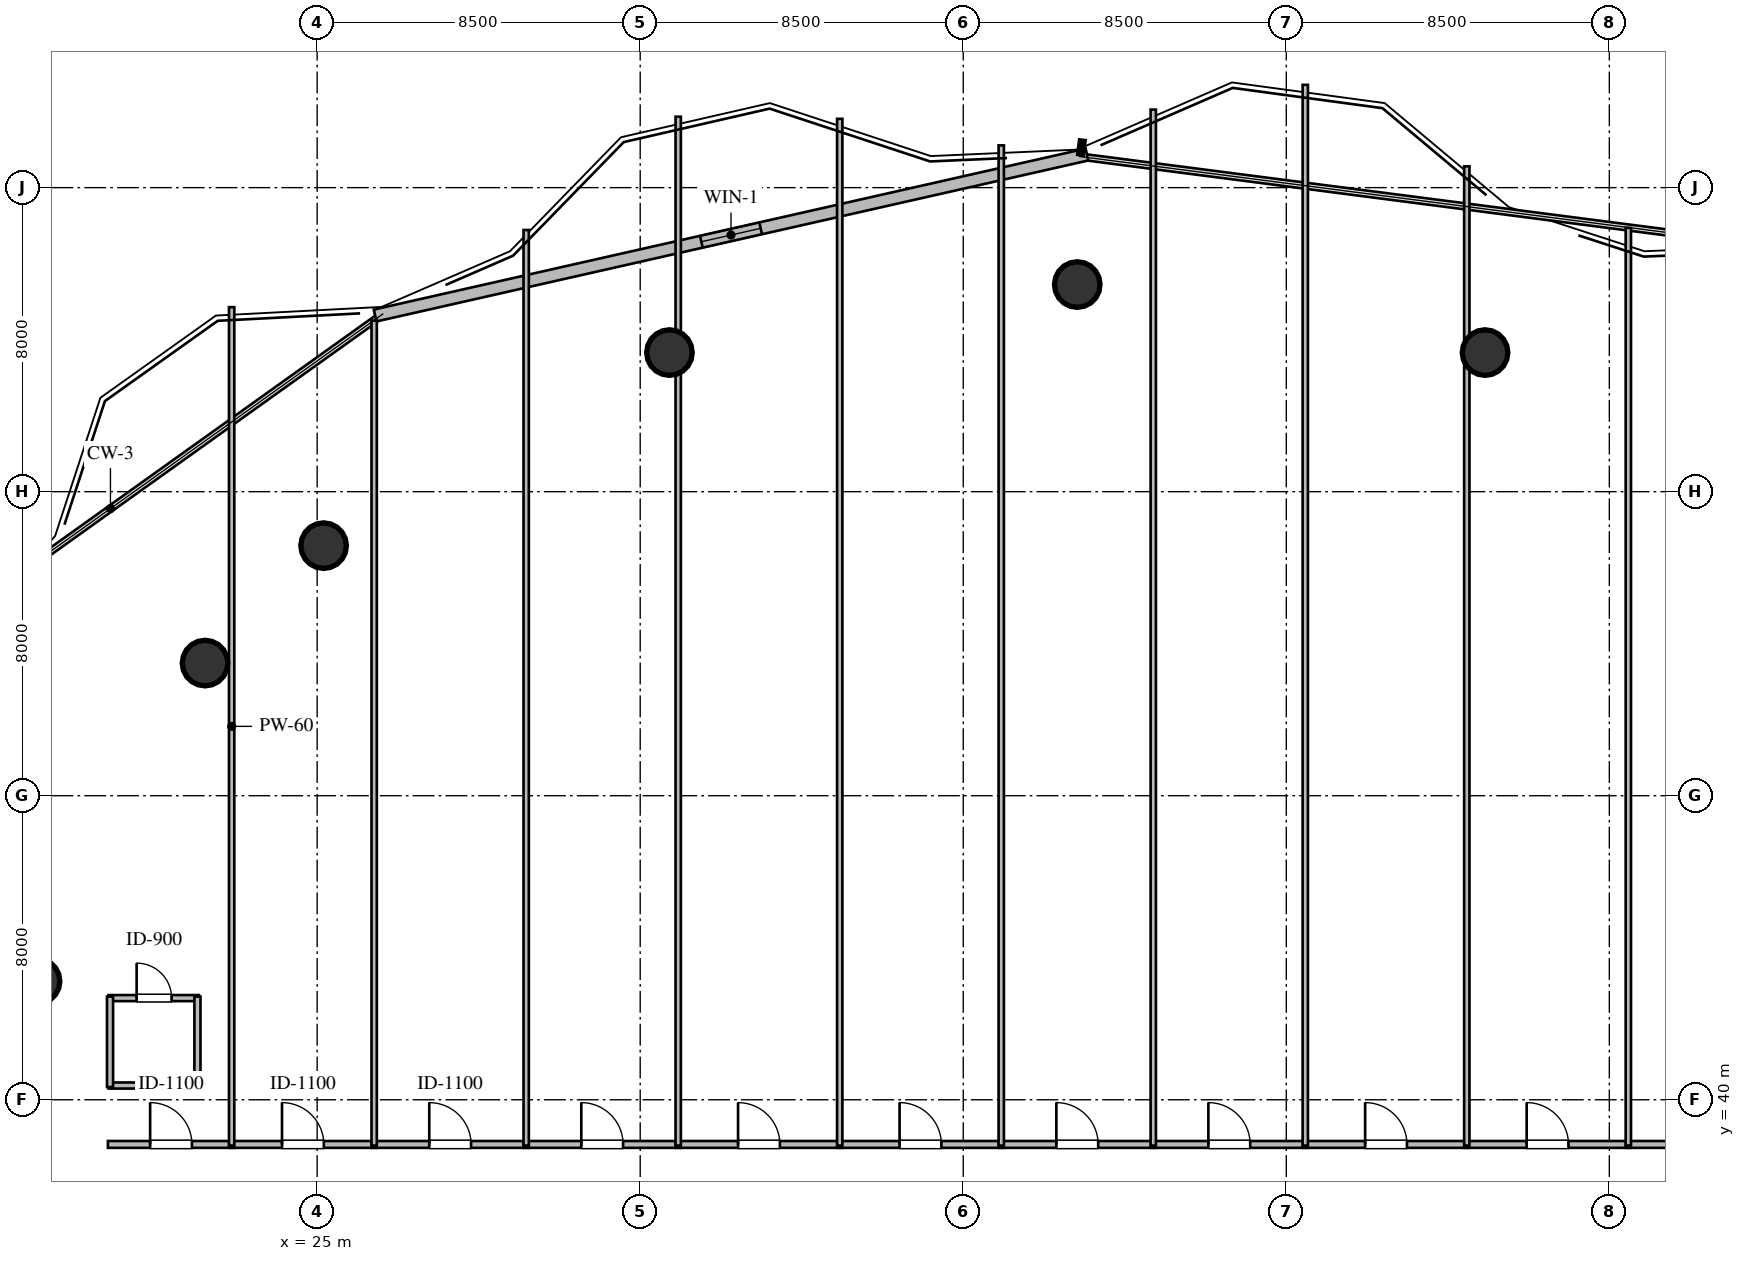
"""IFC4 building model, lengths in metres.
Left out: names, types, materials, properties, quantities, classifications, styles, units other than length and angle.
Written with IfcOpenShell. Run it as: python <this file> out.ifc"""

import sys

from ifc_helpers import new_model, si_unit, direction, frame, frame_2d, origin, origin_2d, place, context, subcontext, project, spatial, rectangle, circle, extrude, element, fill, save


model = new_model("IFC4")
c1 = context("Model", 3, precision=1e-05, world=origin(), true_north=direction((0.0, 1.0)))
c2 = subcontext(c1, "Body", "Model", "MODEL_VIEW")
j1 = project(units=[si_unit("LENGTHUNIT", "METRE"), si_unit("PLANEANGLEUNIT", "RADIAN")], contexts=[c1])
p1 = place(None, origin())
s1 = spatial("IfcSite", under=j1, at=p1, CompositionType="ELEMENT")
p2 = place(p1, origin())
s2 = spatial("IfcBuilding", under=s1, at=p2, CompositionType="ELEMENT")
p3 = place(p2, frame((0.0, 0.0, 145.8)))
s3 = spatial("IfcBuildingStorey", under=s2, at=p3, CompositionType="ELEMENT", Elevation=145.8)
for number, where, z_axis, x_axis in (
    (1, (55.73, 59.66, 0.0), (0.0, 0.0, 1.0), (1.0, 0.0, 0.0)),
    (2, (45.0, 61.45, 0.0), (0.0, 0.0, 1.0), (1.0, 0.0, 0.0)),
    (3, (34.27, 59.66, 0.0), (0.0, 0.0, 1.0), (1.0, 0.0, 0.0)),
    (4, (25.17, 54.58, 0.0), (0.0, 0.0, 1.0), (1.0, 0.0, 0.0)),
    (5, (22.05, 51.49, 0.0), (0.0, 0.0, 1.0), (1.0, 0.0, 0.0)),
    (6, (17.63, 43.12, 0.0), (0.0, 0.0, 1.0), (1.0, 0.0, 0.0)),
):
    element("IfcColumn", number, at=place(p3, frame(where, z_axis=z_axis, x_axis=x_axis)), inside=s3, PredefinedType="COLUMN", context=c2, shape_type="SweptSolid", body=[
        extrude(circle(Radius=0.6, at=origin_2d()), origin(), (0.0, 0.0, 1.0), 3.6),
    ])
p4 = place(p3, frame((26.525, 60.635, 0.0), z_axis=(0.0, 0.0, 1.0), x_axis=(0.975368700272, 0.220580820855, 0.0)))
e7 = element("IfcWall", 7, at=p4, inside=s3, PredefinedType="STANDARD", context=c2, shape_type="SweptSolid", body=[
    extrude(rectangle(XDim=19.204, YDim=0.32, at=frame_2d((9.602, 0.0))), origin(), (0.0, 0.0, 1.0), 3.36),
])
p5 = place(p4, frame((8.801, 0.0, 1.05)))
e8 = element("IfcOpeningElement", 8, at=p5, cuts=e7, PredefinedType="OPENING", context=c2, shape_type="SweptSolid", body=[
    extrude(rectangle(XDim=1.6, YDim=1.5, at=frame_2d((0.8, 0.75))), frame((0.0, 0.17, 0.0), z_axis=(0.0, -1.0, 0.0), x_axis=(1.0, 0.0, 0.0)), (0.0, 0.0, 1.0), 0.34),
])
p6 = place(p3, frame((19.51, 40.375, 0.0), z_axis=(0.0, 0.0, 1.0), x_axis=(1.0, 0.0, 0.0)))
e9 = element("IfcWall", 9, at=p6, inside=s3, PredefinedType="PLUMBINGWALL", context=c2, shape_type="SweptSolid", body=[
    extrude(rectangle(XDim=2.38, YDim=0.16, at=frame_2d((1.19, 0.0))), origin(), (0.0, 0.0, 1.0), 3.36),
])
p7 = place(p3, frame((19.51, 42.675, 0.0), z_axis=(0.0, 0.0, 1.0), x_axis=(1.0, 0.0, 0.0)))
e10 = element("IfcWall", 10, at=p7, inside=s3, PredefinedType="PLUMBINGWALL", context=c2, shape_type="SweptSolid", body=[
    extrude(rectangle(XDim=2.38, YDim=0.16, at=frame_2d((1.19, 0.0))), origin(), (0.0, 0.0, 1.0), 3.36),
])
p8 = place(p7, frame((0.74, 0.0, 0.0)))
e11 = element("IfcOpeningElement", 11, at=p8, cuts=e10, PredefinedType="OPENING", context=c2, shape_type="SweptSolid", body=[
    extrude(rectangle(XDim=0.92, YDim=2.1, at=frame_2d((0.46, 1.05))), frame((0.0, 0.09, 0.0), z_axis=(0.0, -1.0, 0.0), x_axis=(1.0, 0.0, 0.0)), (0.0, 0.0, 1.0), 0.18),
])
p9 = place(p3, frame((19.55, 40.335, 0.0), z_axis=(0.0, 0.0, 1.0), x_axis=(0.0, 1.0, 0.0)))
e12 = element("IfcWall", 12, at=p9, inside=s3, PredefinedType="PLUMBINGWALL", context=c2, shape_type="SweptSolid", body=[
    extrude(rectangle(XDim=2.38, YDim=0.16, at=frame_2d((1.19, 0.0))), origin(), (0.0, 0.0, 1.0), 3.36),
])
p10 = place(p3, frame((21.85, 40.335, 0.0), z_axis=(0.0, 0.0, 1.0), x_axis=(0.0, 1.0, 0.0)))
e13 = element("IfcWall", 13, at=p10, inside=s3, PredefinedType="PLUMBINGWALL", context=c2, shape_type="SweptSolid", body=[
    extrude(rectangle(XDim=2.38, YDim=0.16, at=frame_2d((1.19, 0.0))), origin(), (0.0, 0.0, 1.0), 2.806),
])
p11 = place(p3, frame((19.495, 38.825, 0.0), z_axis=(0.0, 0.0, 1.0), x_axis=(1.0, 0.0, 0.0)))
e14 = element("IfcWall", 14, at=p11, inside=s3, PredefinedType="PARTITIONING", context=c2, shape_type="SweptSolid", body=[
    extrude(rectangle(XDim=3.32, YDim=0.18, at=frame_2d((1.66, 0.0))), origin(), (0.0, 0.0, 1.0), 3.36),
])
p12 = place(p11, frame((1.11, 0.0, 0.0)))
e15 = element("IfcOpeningElement", 15, at=p12, cuts=e14, PredefinedType="OPENING", context=c2, shape_type="SweptSolid", body=[
    extrude(rectangle(XDim=1.1, YDim=2.1, at=frame_2d((0.55, 1.05))), frame((0.0, 0.1, 0.0), z_axis=(0.0, -1.0, 0.0), x_axis=(1.0, 0.0, 0.0)), (0.0, 0.0, 1.0), 0.2),
])
p13 = place(p3, frame((22.685, 38.825, 0.0), z_axis=(0.0, 0.0, 1.0), x_axis=(1.0, 0.0, 0.0)))
e16 = element("IfcWall", 16, at=p13, inside=s3, PredefinedType="PARTITIONING", context=c2, shape_type="SweptSolid", body=[
    extrude(rectangle(XDim=3.88, YDim=0.18, at=frame_2d((1.94, 0.0))), origin(), (0.0, 0.0, 1.0), 3.36),
])
p14 = place(p13, frame((1.39, 0.0, 0.0)))
e17 = element("IfcOpeningElement", 17, at=p14, cuts=e16, PredefinedType="OPENING", context=c2, shape_type="SweptSolid", body=[
    extrude(rectangle(XDim=1.1, YDim=2.1, at=frame_2d((0.55, 1.05))), frame((0.0, 0.1, 0.0), z_axis=(0.0, -1.0, 0.0), x_axis=(1.0, 0.0, 0.0)), (0.0, 0.0, 1.0), 0.2),
])
p15 = place(p3, frame((26.435, 38.825, 0.0), z_axis=(0.0, 0.0, 1.0), x_axis=(1.0, 0.0, 0.0)))
e18 = element("IfcWall", 18, at=p15, inside=s3, PredefinedType="PARTITIONING", context=c2, shape_type="SweptSolid", body=[
    extrude(rectangle(XDim=4.13, YDim=0.18, at=frame_2d((2.065, 0.0))), origin(), (0.0, 0.0, 1.0), 3.36),
])
p16 = place(p15, frame((1.515, 0.0, 0.0)))
e19 = element("IfcOpeningElement", 19, at=p16, cuts=e18, PredefinedType="OPENING", context=c2, shape_type="SweptSolid", body=[
    extrude(rectangle(XDim=1.1, YDim=2.1, at=frame_2d((0.55, 1.05))), frame((0.0, 0.1, 0.0), z_axis=(0.0, -1.0, 0.0), x_axis=(1.0, 0.0, 0.0)), (0.0, 0.0, 1.0), 0.2),
])
p17 = place(p3, frame((30.435, 38.825, 0.0), z_axis=(0.0, 0.0, 1.0), x_axis=(1.0, 0.0, 0.0)))
e20 = element("IfcWall", 20, at=p17, inside=s3, PredefinedType="PARTITIONING", context=c2, shape_type="SweptSolid", body=[
    extrude(rectangle(XDim=4.13, YDim=0.18, at=frame_2d((2.065, 0.0))), origin(), (0.0, 0.0, 1.0), 3.36),
])
p18 = place(p17, frame((1.515, 0.0, 0.0)))
e21 = element("IfcOpeningElement", 21, at=p18, cuts=e20, PredefinedType="OPENING", context=c2, shape_type="SweptSolid", body=[
    extrude(rectangle(XDim=1.1, YDim=2.1, at=frame_2d((0.55, 1.05))), frame((0.0, 0.1, 0.0), z_axis=(0.0, -1.0, 0.0), x_axis=(1.0, 0.0, 0.0)), (0.0, 0.0, 1.0), 0.2),
])
p19 = place(p3, frame((34.435, 38.825, 0.0), z_axis=(0.0, 0.0, 1.0), x_axis=(1.0, 0.0, 0.0)))
e22 = element("IfcWall", 22, at=p19, inside=s3, PredefinedType="PARTITIONING", context=c2, shape_type="SweptSolid", body=[
    extrude(rectangle(XDim=4.38, YDim=0.18, at=frame_2d((2.19, 0.0))), origin(), (0.0, 0.0, 1.0), 3.36),
])
p20 = place(p19, frame((1.64, 0.0, 0.0)))
e23 = element("IfcOpeningElement", 23, at=p20, cuts=e22, PredefinedType="OPENING", context=c2, shape_type="SweptSolid", body=[
    extrude(rectangle(XDim=1.1, YDim=2.1, at=frame_2d((0.55, 1.05))), frame((0.0, 0.1, 0.0), z_axis=(0.0, -1.0, 0.0), x_axis=(1.0, 0.0, 0.0)), (0.0, 0.0, 1.0), 0.2),
])
p21 = place(p3, frame((38.685, 38.825, 0.0), z_axis=(0.0, 0.0, 1.0), x_axis=(1.0, 0.0, 0.0)))
e24 = element("IfcWall", 24, at=p21, inside=s3, PredefinedType="PARTITIONING", context=c2, shape_type="SweptSolid", body=[
    extrude(rectangle(XDim=4.38, YDim=0.18, at=frame_2d((2.19, 0.0))), origin(), (0.0, 0.0, 1.0), 3.36),
])
p22 = place(p21, frame((1.64, 0.0, 0.0)))
e25 = element("IfcOpeningElement", 25, at=p22, cuts=e24, PredefinedType="OPENING", context=c2, shape_type="SweptSolid", body=[
    extrude(rectangle(XDim=1.1, YDim=2.1, at=frame_2d((0.55, 1.05))), frame((0.0, 0.1, 0.0), z_axis=(0.0, -1.0, 0.0), x_axis=(1.0, 0.0, 0.0)), (0.0, 0.0, 1.0), 0.2),
])
p23 = place(p3, frame((42.935, 38.825, 0.0), z_axis=(0.0, 0.0, 1.0), x_axis=(1.0, 0.0, 0.0)))
e26 = element("IfcWall", 26, at=p23, inside=s3, PredefinedType="PARTITIONING", context=c2, shape_type="SweptSolid", body=[
    extrude(rectangle(XDim=4.13, YDim=0.18, at=frame_2d((2.065, 0.0))), origin(), (0.0, 0.0, 1.0), 3.36),
])
p24 = place(p23, frame((1.515, 0.0, 0.0)))
e27 = element("IfcOpeningElement", 27, at=p24, cuts=e26, PredefinedType="OPENING", context=c2, shape_type="SweptSolid", body=[
    extrude(rectangle(XDim=1.1, YDim=2.1, at=frame_2d((0.55, 1.05))), frame((0.0, 0.1, 0.0), z_axis=(0.0, -1.0, 0.0), x_axis=(1.0, 0.0, 0.0)), (0.0, 0.0, 1.0), 0.2),
])
p25 = place(p3, frame((46.935, 38.825, 0.0), z_axis=(0.0, 0.0, 1.0), x_axis=(1.0, 0.0, 0.0)))
e28 = element("IfcWall", 28, at=p25, inside=s3, PredefinedType="PARTITIONING", context=c2, shape_type="SweptSolid", body=[
    extrude(rectangle(XDim=4.13, YDim=0.18, at=frame_2d((2.065, 0.0))), origin(), (0.0, 0.0, 1.0), 3.36),
])
p26 = place(p25, frame((1.515, 0.0, 0.0)))
e29 = element("IfcOpeningElement", 29, at=p26, cuts=e28, PredefinedType="OPENING", context=c2, shape_type="SweptSolid", body=[
    extrude(rectangle(XDim=1.1, YDim=2.1, at=frame_2d((0.55, 1.05))), frame((0.0, 0.1, 0.0), z_axis=(0.0, -1.0, 0.0), x_axis=(1.0, 0.0, 0.0)), (0.0, 0.0, 1.0), 0.2),
])
p27 = place(p3, frame((50.935, 38.825, 0.0), z_axis=(0.0, 0.0, 1.0), x_axis=(1.0, 0.0, 0.0)))
e30 = element("IfcWall", 30, at=p27, inside=s3, PredefinedType="PARTITIONING", context=c2, shape_type="SweptSolid", body=[
    extrude(rectangle(XDim=4.38, YDim=0.18, at=frame_2d((2.19, 0.0))), origin(), (0.0, 0.0, 1.0), 3.36),
])
p28 = place(p27, frame((1.64, 0.0, 0.0)))
e31 = element("IfcOpeningElement", 31, at=p28, cuts=e30, PredefinedType="OPENING", context=c2, shape_type="SweptSolid", body=[
    extrude(rectangle(XDim=1.1, YDim=2.1, at=frame_2d((0.55, 1.05))), frame((0.0, 0.1, 0.0), z_axis=(0.0, -1.0, 0.0), x_axis=(1.0, 0.0, 0.0)), (0.0, 0.0, 1.0), 0.2),
])
p29 = place(p3, frame((55.185, 38.825, 0.0), z_axis=(0.0, 0.0, 1.0), x_axis=(1.0, 0.0, 0.0)))
e32 = element("IfcWall", 32, at=p29, inside=s3, PredefinedType="PARTITIONING", context=c2, shape_type="SweptSolid", body=[
    extrude(rectangle(XDim=4.38, YDim=0.18, at=frame_2d((2.19, 0.0))), origin(), (0.0, 0.0, 1.0), 3.36),
])
p30 = place(p29, frame((1.64, 0.0, 0.0)))
e33 = element("IfcOpeningElement", 33, at=p30, cuts=e32, PredefinedType="OPENING", context=c2, shape_type="SweptSolid", body=[
    extrude(rectangle(XDim=1.1, YDim=2.1, at=frame_2d((0.55, 1.05))), frame((0.0, 0.1, 0.0), z_axis=(0.0, -1.0, 0.0), x_axis=(1.0, 0.0, 0.0)), (0.0, 0.0, 1.0), 0.2),
])
p31 = place(p3, frame((59.435, 38.825, 0.0), z_axis=(0.0, 0.0, 1.0), x_axis=(1.0, 0.0, 0.0)))
e34 = element("IfcWall", 34, at=p31, inside=s3, PredefinedType="PARTITIONING", context=c2, shape_type="SweptSolid", body=[
    extrude(rectangle(XDim=9.095, YDim=0.18, at=frame_2d((4.547, 0.0))), origin(), (0.0, 0.0, 1.0), 3.36),
])
p32 = place(p31, frame((3.998, 0.0, 0.0)))
e35 = element("IfcOpeningElement", 35, at=p32, cuts=e34, PredefinedType="OPENING", context=c2, shape_type="SweptSolid", body=[
    extrude(rectangle(XDim=1.1, YDim=2.1, at=frame_2d((0.55, 1.05))), frame((0.0, 0.1, 0.0), z_axis=(0.0, -1.0, 0.0), x_axis=(1.0, 0.0, 0.0)), (0.0, 0.0, 1.0), 0.2),
])
p33 = place(p3, frame((22.75, 60.855, 0.0), z_axis=(0.0, 0.0, 1.0), x_axis=(0.0, -1.0, 0.0)))
e36 = element("IfcWall", 36, at=p33, inside=s3, PredefinedType="PARTITIONING", context=c2, shape_type="SweptSolid", body=[
    extrude(rectangle(XDim=22.06, YDim=0.14, at=frame_2d((11.03, 0.0))), origin(), (0.0, 0.0, 1.0), 2.806),
])
p34 = place(p3, frame((26.5, 60.502, 0.0), z_axis=(0.0, 0.0, 1.0), x_axis=(0.0, -1.0, 0.0)))
e37 = element("IfcWall", 37, at=p34, inside=s3, PredefinedType="PARTITIONING", context=c2, shape_type="SweptSolid", body=[
    extrude(rectangle(XDim=21.708, YDim=0.14, at=frame_2d((10.854, 0.0))), origin(), (0.0, 0.0, 1.0), 3.36),
])
p35 = place(p3, frame((30.5, 62.885, 0.0), z_axis=(0.0, 0.0, 1.0), x_axis=(0.0, -1.0, 0.0)))
e38 = element("IfcWall", 38, at=p35, inside=s3, PredefinedType="PARTITIONING", context=c2, shape_type="SweptSolid", body=[
    extrude(rectangle(XDim=24.09, YDim=0.14, at=frame_2d((12.045, 0.0))), origin(), (0.0, 0.0, 1.0), 3.36),
])
p36 = place(p3, frame((34.5, 65.866, 0.0), z_axis=(0.0, 0.0, 1.0), x_axis=(0.0, -1.0, 0.0)))
e39 = element("IfcWall", 39, at=p36, inside=s3, PredefinedType="PARTITIONING", context=c2, shape_type="SweptSolid", body=[
    extrude(rectangle(XDim=27.071, YDim=0.14, at=frame_2d((13.536, 0.0))), origin(), (0.0, 0.0, 1.0), 2.806),
])
p37 = place(p3, frame((38.75, 65.81, 0.0), z_axis=(0.0, 0.0, 1.0), x_axis=(0.0, -1.0, 0.0)))
e40 = element("IfcWall", 40, at=p37, inside=s3, PredefinedType="PARTITIONING", context=c2, shape_type="SweptSolid", body=[
    extrude(rectangle(XDim=27.015, YDim=0.14, at=frame_2d((13.508, 0.0))), origin(), (0.0, 0.0, 1.0), 3.36),
])
p38 = place(p3, frame((43.0, 65.112, 0.0), z_axis=(0.0, 0.0, 1.0), x_axis=(0.0, -1.0, 0.0)))
e41 = element("IfcWall", 41, at=p38, inside=s3, PredefinedType="PARTITIONING", context=c2, shape_type="SweptSolid", body=[
    extrude(rectangle(XDim=26.317, YDim=0.14, at=frame_2d((13.159, 0.0))), origin(), (0.0, 0.0, 1.0), 3.36),
])
p39 = place(p3, frame((47.0, 66.053, 0.0), z_axis=(0.0, 0.0, 1.0), x_axis=(0.0, -1.0, 0.0)))
e42 = element("IfcWall", 42, at=p39, inside=s3, PredefinedType="PARTITIONING", context=c2, shape_type="SweptSolid", body=[
    extrude(rectangle(XDim=27.258, YDim=0.14, at=frame_2d((13.629, 0.0))), origin(), (0.0, 0.0, 1.0), 3.36),
])
p40 = place(p3, frame((51.0, 66.705, 0.0), z_axis=(0.0, 0.0, 1.0), x_axis=(0.0, -1.0, 0.0)))
e43 = element("IfcWall", 43, at=p40, inside=s3, PredefinedType="PARTITIONING", context=c2, shape_type="SweptSolid", body=[
    extrude(rectangle(XDim=27.91, YDim=0.14, at=frame_2d((13.955, 0.0))), origin(), (0.0, 0.0, 1.0), 3.36),
])
p41 = place(p3, frame((55.25, 64.56, 0.0), z_axis=(0.0, 0.0, 1.0), x_axis=(0.0, -1.0, 0.0)))
e44 = element("IfcWall", 44, at=p41, inside=s3, PredefinedType="PARTITIONING", context=c2, shape_type="SweptSolid", body=[
    extrude(rectangle(XDim=25.765, YDim=0.14, at=frame_2d((12.883, 0.0))), origin(), (0.0, 0.0, 1.0), 3.36),
])
p42 = place(p3, frame((59.5, 62.941, 0.0), z_axis=(0.0, 0.0, 1.0), x_axis=(0.0, -1.0, 0.0)))
e45 = element("IfcWall", 45, at=p42, inside=s3, PredefinedType="PARTITIONING", context=c2, shape_type="SweptSolid", body=[
    extrude(rectangle(XDim=24.146, YDim=0.14, at=frame_2d((12.073, 0.0))), origin(), (0.0, 0.0, 1.0), 2.996),
])
p43 = place(p5, origin())
e46 = element("IfcWindow", 46, at=p43, inside=s3, PartitioningType="SINGLE_PANEL", PredefinedType="WINDOW", context=c2, shape_type="SweptSolid", body=[
    extrude(rectangle(XDim=1.6, YDim=1.5, at=frame_2d((0.8, 0.75))), frame((0.0, 0.03, 0.0), z_axis=(0.0, -1.0, 0.0), x_axis=(1.0, 0.0, 0.0)), (0.0, 0.0, 1.0), 0.06),
])
fill(e8, e46)
p44 = place(p8, origin())
e47 = element("IfcDoor", 47, at=p44, inside=s3, OperationType="SINGLE_SWING_LEFT", PredefinedType="DOOR", context=c2, shape_type="SweptSolid", body=[
    extrude(rectangle(XDim=0.92, YDim=2.1, at=frame_2d((0.46, 1.05))), frame((0.0, 0.025, 0.0), z_axis=(0.0, -1.0, 0.0), x_axis=(1.0, 0.0, 0.0)), (0.0, 0.0, 1.0), 0.05),
])
fill(e11, e47)
p45 = place(p12, origin())
e48 = element("IfcDoor", 48, at=p45, inside=s3, OperationType="SINGLE_SWING_LEFT", PredefinedType="DOOR", context=c2, shape_type="SweptSolid", body=[
    extrude(rectangle(XDim=1.1, YDim=2.1, at=frame_2d((0.55, 1.05))), frame((0.0, 0.025, 0.0), z_axis=(0.0, -1.0, 0.0), x_axis=(1.0, 0.0, 0.0)), (0.0, 0.0, 1.0), 0.05),
])
fill(e15, e48)
p46 = place(p14, origin())
e49 = element("IfcDoor", 49, at=p46, inside=s3, OperationType="SINGLE_SWING_LEFT", PredefinedType="DOOR", context=c2, shape_type="SweptSolid", body=[
    extrude(rectangle(XDim=1.1, YDim=2.1, at=frame_2d((0.55, 1.05))), frame((0.0, 0.025, 0.0), z_axis=(0.0, -1.0, 0.0), x_axis=(1.0, 0.0, 0.0)), (0.0, 0.0, 1.0), 0.05),
])
fill(e17, e49)
p47 = place(p16, origin())
e50 = element("IfcDoor", 50, at=p47, inside=s3, OperationType="SINGLE_SWING_LEFT", PredefinedType="DOOR", context=c2, shape_type="SweptSolid", body=[
    extrude(rectangle(XDim=1.1, YDim=2.1, at=frame_2d((0.55, 1.05))), frame((0.0, 0.025, 0.0), z_axis=(0.0, -1.0, 0.0), x_axis=(1.0, 0.0, 0.0)), (0.0, 0.0, 1.0), 0.05),
])
fill(e19, e50)
p48 = place(p18, origin())
e51 = element("IfcDoor", 51, at=p48, inside=s3, OperationType="SINGLE_SWING_LEFT", PredefinedType="DOOR", context=c2, shape_type="SweptSolid", body=[
    extrude(rectangle(XDim=1.1, YDim=2.1, at=frame_2d((0.55, 1.05))), frame((0.0, 0.025, 0.0), z_axis=(0.0, -1.0, 0.0), x_axis=(1.0, 0.0, 0.0)), (0.0, 0.0, 1.0), 0.05),
])
fill(e21, e51)
p49 = place(p20, origin())
e52 = element("IfcDoor", 52, at=p49, inside=s3, OperationType="SINGLE_SWING_LEFT", PredefinedType="DOOR", context=c2, shape_type="SweptSolid", body=[
    extrude(rectangle(XDim=1.1, YDim=2.1, at=frame_2d((0.55, 1.05))), frame((0.0, 0.025, 0.0), z_axis=(0.0, -1.0, 0.0), x_axis=(1.0, 0.0, 0.0)), (0.0, 0.0, 1.0), 0.05),
])
fill(e23, e52)
p50 = place(p22, origin())
e53 = element("IfcDoor", 53, at=p50, inside=s3, OperationType="SINGLE_SWING_LEFT", PredefinedType="DOOR", context=c2, shape_type="SweptSolid", body=[
    extrude(rectangle(XDim=1.1, YDim=2.1, at=frame_2d((0.55, 1.05))), frame((0.0, 0.025, 0.0), z_axis=(0.0, -1.0, 0.0), x_axis=(1.0, 0.0, 0.0)), (0.0, 0.0, 1.0), 0.05),
])
fill(e25, e53)
p51 = place(p24, origin())
e54 = element("IfcDoor", 54, at=p51, inside=s3, OperationType="SINGLE_SWING_LEFT", PredefinedType="DOOR", context=c2, shape_type="SweptSolid", body=[
    extrude(rectangle(XDim=1.1, YDim=2.1, at=frame_2d((0.55, 1.05))), frame((0.0, 0.025, 0.0), z_axis=(0.0, -1.0, 0.0), x_axis=(1.0, 0.0, 0.0)), (0.0, 0.0, 1.0), 0.05),
])
fill(e27, e54)
p52 = place(p26, origin())
e55 = element("IfcDoor", 55, at=p52, inside=s3, OperationType="SINGLE_SWING_LEFT", PredefinedType="DOOR", context=c2, shape_type="SweptSolid", body=[
    extrude(rectangle(XDim=1.1, YDim=2.1, at=frame_2d((0.55, 1.05))), frame((0.0, 0.025, 0.0), z_axis=(0.0, -1.0, 0.0), x_axis=(1.0, 0.0, 0.0)), (0.0, 0.0, 1.0), 0.05),
])
fill(e29, e55)
p53 = place(p28, origin())
e56 = element("IfcDoor", 56, at=p53, inside=s3, OperationType="SINGLE_SWING_LEFT", PredefinedType="DOOR", context=c2, shape_type="SweptSolid", body=[
    extrude(rectangle(XDim=1.1, YDim=2.1, at=frame_2d((0.55, 1.05))), frame((0.0, 0.025, 0.0), z_axis=(0.0, -1.0, 0.0), x_axis=(1.0, 0.0, 0.0)), (0.0, 0.0, 1.0), 0.05),
])
fill(e31, e56)
p54 = place(p30, origin())
e57 = element("IfcDoor", 57, at=p54, inside=s3, OperationType="SINGLE_SWING_LEFT", PredefinedType="DOOR", context=c2, shape_type="SweptSolid", body=[
    extrude(rectangle(XDim=1.1, YDim=2.1, at=frame_2d((0.55, 1.05))), frame((0.0, 0.025, 0.0), z_axis=(0.0, -1.0, 0.0), x_axis=(1.0, 0.0, 0.0)), (0.0, 0.0, 1.0), 0.05),
])
fill(e33, e57)
save(model, sys.argv[1])
